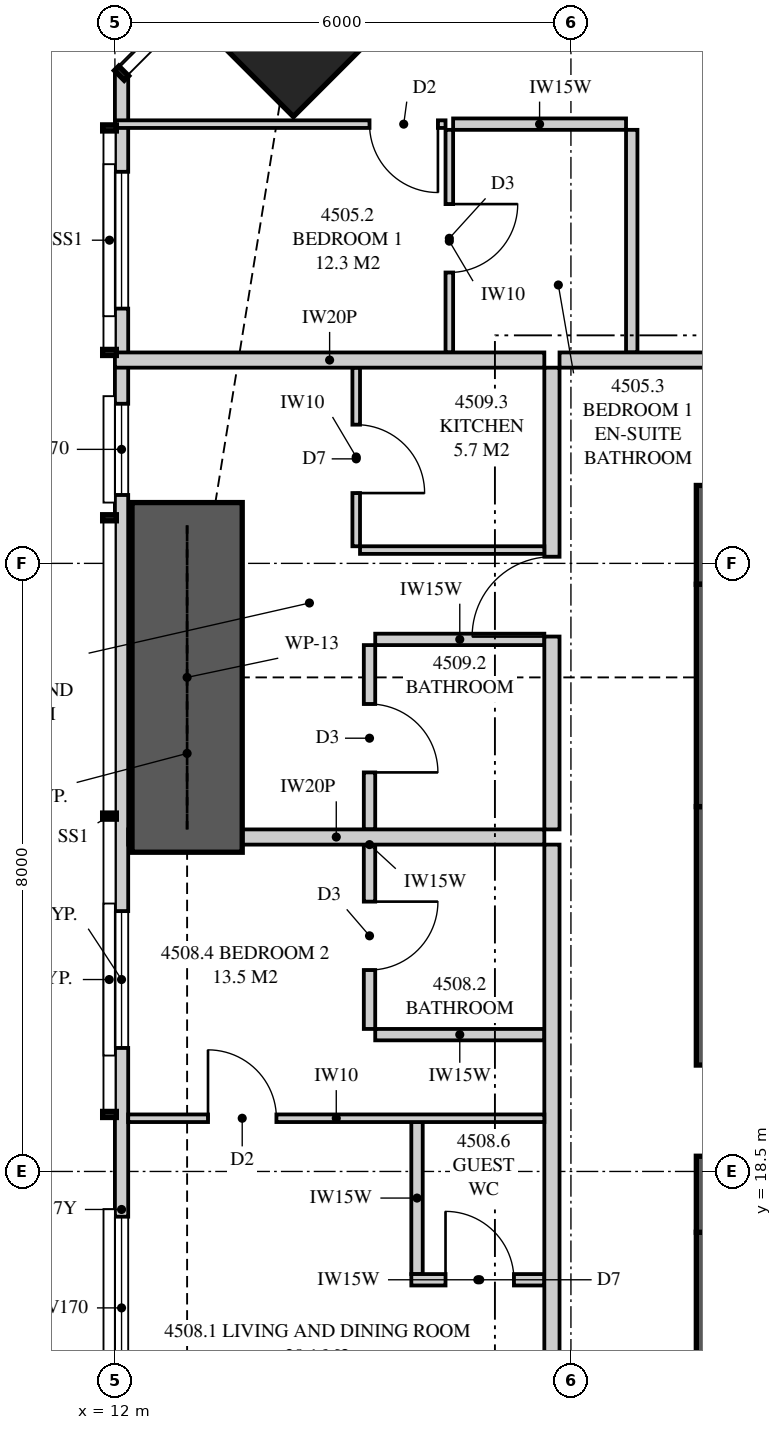
"""IFC4 building model, lengths in metres.
Left out: names, types, materials, properties, quantities, classifications, styles, units other than length and angle.
Written with IfcOpenShell. Run it as: python <this file> out.ifc"""

import sys

from ifc_helpers import new_model, si_unit, direction, frame, frame_2d, origin, origin_2d, place, context, subcontext, project, spatial, polyline, rectangle, outline, extrude, element, fill, save


model = new_model("IFC4")
c1 = context("Model", 3, precision=1e-05, world=origin(), true_north=direction((0.0, 1.0)))
c2 = subcontext(c1, "Body", "Model", "MODEL_VIEW")
j1 = project(units=[si_unit("LENGTHUNIT", "METRE"), si_unit("PLANEANGLEUNIT", "RADIAN")], contexts=[c1])
p1 = place(None, origin())
s1 = spatial("IfcSite", under=j1, at=p1, CompositionType="ELEMENT")
p2 = place(p1, origin())
s2 = spatial("IfcBuilding", under=s1, at=p2, CompositionType="ELEMENT")
p3 = place(p2, frame((0.0, 0.0, 167.75)))
s3 = spatial("IfcBuildingStorey", under=s2, at=p3, CompositionType="ELEMENT", Elevation=167.75)
p4 = place(p3, frame((14.348, 33.652, 0.0), z_axis=(0.0, 0.0, 1.0), x_axis=(0.707106781187, 0.707106781187, 0.0)))
e1 = element("IfcColumn", 1, at=p4, inside=s3, PredefinedType="COLUMN", context=c2, shape_type="SweptSolid", body=[
    extrude(rectangle(XDim=1.8, YDim=1.8, at=origin_2d()), origin(), (0.0, 0.0, 1.0), 3.35),
])
p5 = place(p3, frame((26.0, 26.875, 0.0), z_axis=(0.0, 0.0, 1.0), x_axis=(-1.0, 0.0, 0.0)))
e2 = element("IfcWall", 2, at=p5, inside=s3, PredefinedType="SHEAR", context=c2, shape_type="SweptSolid", body=[
    extrude(rectangle(XDim=6.35, YDim=1.3, at=frame_2d((3.175, 0.0))), origin(), (0.0, 0.0, 1.0), 3.35),
])
p6 = place(p5, frame((0.825, 0.0, 0.0)))
e3 = element("IfcOpeningElement", 3, at=p6, cuts=e2, PredefinedType="OPENING", context=c2, shape_type="SweptSolid", body=[
    extrude(rectangle(XDim=0.75, YDim=2.1, at=frame_2d((0.375, 1.05))), frame((0.0, 0.66, 0.0), z_axis=(0.0, -1.0, 0.0), x_axis=(1.0, 0.0, 0.0)), (0.0, 0.0, 1.0), 1.32),
])
p7 = place(p3, frame((20.0, 26.225, 0.0), z_axis=(0.0, 0.0, 1.0), x_axis=(0.0, -1.0, 0.0)))
e4 = element("IfcWall", 4, at=p7, inside=s3, PredefinedType="SHEAR", context=c2, shape_type="SweptSolid", body=[
    extrude(rectangle(XDim=2.925, YDim=0.7, at=frame_2d((1.462, 0.0))), origin(), (0.0, 0.0, 1.0), 3.35),
])
p8 = place(p3, frame((20.0, 23.3, 0.0), z_axis=(0.0, 0.0, 1.0), x_axis=(0.0, -1.0, 0.0)))
e5 = element("IfcWall", 5, at=p8, inside=s3, PredefinedType="SHEAR", context=c2, shape_type="SweptSolid", body=[
    extrude(rectangle(XDim=5.6, YDim=0.7, at=frame_2d((2.8, 0.0))), origin(), (0.0, 0.0, 1.0), 3.35),
])
p9 = place(p8, frame((3.4, 0.0, 0.0)))
e6 = element("IfcOpeningElement", 6, at=p9, cuts=e5, PredefinedType="OPENING", context=c2, shape_type="SweptSolid", body=[
    extrude(rectangle(XDim=1.2, YDim=2.2, at=frame_2d((0.6, 1.1))), frame((0.0, 0.36, 0.0), z_axis=(0.0, -1.0, 0.0), x_axis=(1.0, 0.0, 0.0)), (0.0, 0.0, 1.0), 0.72),
])
p10 = place(p3, frame((20.0, 17.7, 0.0), z_axis=(0.0, 0.0, 1.0), x_axis=(0.0, -1.0, 0.0)))
e7 = element("IfcWall", 7, at=p10, inside=s3, PredefinedType="SHEAR", context=c2, shape_type="SweptSolid", body=[
    extrude(rectangle(XDim=4.7, YDim=0.7, at=frame_2d((2.35, 0.0))), origin(), (0.0, 0.0, 1.0), 3.35),
])
p11 = place(p3, frame((12.087, 32.949, 0.0), z_axis=(0.0, 0.0, 1.0), x_axis=(0.0, -1.0, 0.0)))
e8 = element("IfcWall", 8, at=p11, inside=s3, PredefinedType="SOLIDWALL", context=c2, shape_type="SweptSolid", body=[
    extrude(outline(polyline([(0.0, 0.0), (29.897, 0.0), (29.897, 3.11), (20.191, 3.11), (20.191, 2.15), (20.051, 2.15), (20.051, 3.11), (19.949, 3.11), (19.949, 2.15), (7.949, 2.15), (7.949, 3.11), (7.823, 3.11), (7.823, 2.15), (7.73, 2.15), (7.73, 3.11), (0.0, 3.11), (0.0, 0.0)])), frame((0.0, 0.087, 0.0), z_axis=(0.0, -1.0, 0.0), x_axis=(1.0, 0.0, 0.0)), (0.0, 0.0, 1.0), 0.175),
])
p12 = place(p11, frame((1.297, 0.0, 0.4)))
e9 = element("IfcOpeningElement", 9, at=p12, cuts=e8, PredefinedType="OPENING", context=c2, shape_type="SweptSolid", body=[
    extrude(rectangle(XDim=1.8, YDim=1.7, at=frame_2d((0.9, 0.85))), frame((0.0, 0.097, 0.0), z_axis=(0.0, -1.0, 0.0), x_axis=(1.0, 0.0, 0.0)), (0.0, 0.0, 1.0), 0.195),
])
p13 = place(p11, frame((4.349, 0.0, 0.4)))
e10 = element("IfcOpeningElement", 10, at=p13, cuts=e8, PredefinedType="OPENING", context=c2, shape_type="SweptSolid", body=[
    extrude(rectangle(XDim=1.2, YDim=1.7, at=frame_2d((0.6, 0.85))), frame((0.0, 0.097, 0.0), z_axis=(0.0, -1.0, 0.0), x_axis=(1.0, 0.0, 0.0)), (0.0, 0.0, 1.0), 0.195),
])
p14 = place(p11, frame((11.024, 0.0, 0.4)))
e11 = element("IfcOpeningElement", 11, at=p14, cuts=e8, PredefinedType="OPENING", context=c2, shape_type="SweptSolid", body=[
    extrude(rectangle(XDim=1.8, YDim=1.7, at=frame_2d((0.9, 0.85))), frame((0.0, 0.097, 0.0), z_axis=(0.0, -1.0, 0.0), x_axis=(1.0, 0.0, 0.0)), (0.0, 0.0, 1.0), 0.195),
])
p15 = place(p11, frame((15.044, 0.0, 0.4)))
e12 = element("IfcOpeningElement", 12, at=p15, cuts=e8, PredefinedType="OPENING", context=c2, shape_type="SweptSolid", body=[
    extrude(rectangle(XDim=2.4, YDim=1.7, at=frame_2d((1.2, 0.85))), frame((0.0, 0.097, 0.0), z_axis=(0.0, -1.0, 0.0), x_axis=(1.0, 0.0, 0.0)), (0.0, 0.0, 1.0), 0.195),
])
p16 = place(p11, frame((22.624, 0.0, 0.0)))
e13 = element("IfcOpeningElement", 13, at=p16, cuts=e8, PredefinedType="OPENING", context=c2, shape_type="SweptSolid", body=[
    extrude(rectangle(XDim=1.8, YDim=2.1, at=frame_2d((0.9, 1.05))), frame((0.0, 0.097, 0.0), z_axis=(0.0, -1.0, 0.0), x_axis=(1.0, 0.0, 0.0)), (0.0, 0.0, 1.0), 0.195),
])
p17 = place(p11, frame((26.301, 0.0, 0.4)))
e14 = element("IfcOpeningElement", 14, at=p17, cuts=e8, PredefinedType="OPENING", context=c2, shape_type="SweptSolid", body=[
    extrude(rectangle(XDim=1.8, YDim=1.7, at=frame_2d((0.9, 0.85))), frame((0.0, 0.097, 0.0), z_axis=(0.0, -1.0, 0.0), x_axis=(1.0, 0.0, 0.0)), (0.0, 0.0, 1.0), 0.195),
])
p18 = place(p3, frame((17.85, 29.175, 0.0), z_axis=(0.0, 0.0, 1.0), x_axis=(1.0, 0.0, 0.0)))
e15 = element("IfcWall", 15, at=p18, inside=s3, PredefinedType="PARTITIONING", context=c2, shape_type="SweptSolid", body=[
    extrude(outline(polyline([(0.0, 0.0), (5.75, 0.0), (5.75, 3.11), (4.737, 3.11), (4.737, 2.541), (4.062, 2.541), (4.062, 3.11), (0.0, 3.11), (0.0, 0.0)])), frame((0.0, 0.1, 0.0), z_axis=(0.0, -1.0, 0.0), x_axis=(1.0, 0.0, 0.0)), (0.0, 0.0, 1.0), 0.2),
])
p19 = place(p18, frame((2.35, 0.0, 0.0)))
e16 = element("IfcOpeningElement", 16, at=p19, cuts=e15, PredefinedType="OPENING", context=c2, shape_type="SweptSolid", body=[
    extrude(rectangle(XDim=1.05, YDim=2.2, at=frame_2d((0.525, 1.1))), frame((0.0, 0.11, 0.0), z_axis=(0.0, -1.0, 0.0), x_axis=(1.0, 0.0, 0.0)), (0.0, 0.0, 1.0), 0.22),
])
p20 = place(p3, frame((16.4, 32.204, 0.0), z_axis=(0.0, 0.0, 1.0), x_axis=(0.0, -1.0, 0.0)))
e17 = element("IfcWall", 17, at=p20, inside=s3, PredefinedType="PARTITIONING", context=c2, shape_type="SweptSolid", body=[
    extrude(rectangle(XDim=2.929, YDim=0.1, at=frame_2d((1.464, 0.0))), origin(), (0.0, 0.0, 1.0), 3.11),
])
p21 = place(p20, frame((0.977, 0.0, 0.0)))
e18 = element("IfcOpeningElement", 18, at=p21, cuts=e17, PredefinedType="OPENING", context=c2, shape_type="SweptSolid", body=[
    extrude(rectangle(XDim=0.9, YDim=2.1, at=frame_2d((0.45, 1.05))), frame((0.0, 0.06, 0.0), z_axis=(0.0, -1.0, 0.0), x_axis=(1.0, 0.0, 0.0)), (0.0, 0.0, 1.0), 0.12),
])
p22 = place(p3, frame((16.35, 32.279, 0.0), z_axis=(0.0, 0.0, 1.0), x_axis=(-1.0, 0.0, 0.0)))
e19 = element("IfcWall", 19, at=p22, inside=s3, PredefinedType="PARTITIONING", context=c2, shape_type="SweptSolid", body=[
    extrude(outline(polyline([(0.0, 0.0), (4.35, 0.0), (4.35, 3.11), (3.094, 3.11), (3.094, 2.15), (1.352, 2.15), (1.352, 3.11), (0.0, 3.11), (0.0, 0.0)])), frame((0.0, 0.05, 0.0), z_axis=(0.0, -1.0, 0.0), x_axis=(1.0, 0.0, 0.0)), (0.0, 0.0, 1.0), 0.1),
])
p23 = place(p22, frame((0.1, 0.0, 0.0)))
e20 = element("IfcOpeningElement", 20, at=p23, cuts=e19, PredefinedType="OPENING", context=c2, shape_type="SweptSolid", body=[
    extrude(rectangle(XDim=0.9, YDim=2.1, at=frame_2d((0.45, 1.05))), frame((0.0, 0.06, 0.0), z_axis=(0.0, -1.0, 0.0), x_axis=(1.0, 0.0, 0.0)), (0.0, 0.0, 1.0), 0.12),
])
p24 = place(p3, frame((18.725, 32.279, 0.0), z_axis=(0.0, 0.0, 1.0), x_axis=(-1.0, 0.0, 0.0)))
e21 = element("IfcWall", 21, at=p24, inside=s3, PredefinedType="PLUMBINGWALL", context=c2, shape_type="SweptSolid", body=[
    extrude(rectangle(XDim=2.275, YDim=0.15, at=frame_2d((1.138, 0.0))), origin(), (0.0, 0.0, 1.0), 3.11),
])
p25 = place(p3, frame((18.8, 32.204, 0.0), z_axis=(0.0, 0.0, 1.0), x_axis=(0.0, -1.0, 0.0)))
e22 = element("IfcWall", 22, at=p25, inside=s3, PredefinedType="PLUMBINGWALL", context=c2, shape_type="SweptSolid", body=[
    extrude(rectangle(XDim=2.929, YDim=0.15, at=frame_2d((1.464, 0.0))), origin(), (0.0, 0.0, 1.0), 3.11),
])
p26 = place(p3, frame((12.0, 29.175, 0.0), z_axis=(0.0, 0.0, 1.0), x_axis=(1.0, 0.0, 0.0)))
e23 = element("IfcWall", 23, at=p26, inside=s3, PredefinedType="PARTITIONING", context=c2, shape_type="SweptSolid", body=[
    extrude(outline(polyline([(0.0, 0.0), (5.65, 0.0), (5.65, 3.11), (2.547, 3.11), (2.547, 2.15), (0.703, 2.15), (0.703, 3.11), (0.0, 3.11), (0.0, 0.0)])), frame((0.0, 0.1, 0.0), z_axis=(0.0, -1.0, 0.0), x_axis=(1.0, 0.0, 0.0)), (0.0, 0.0, 1.0), 0.2),
])
p27 = place(p3, frame((12.175, 22.9, 0.0), z_axis=(0.0, 0.0, 1.0), x_axis=(1.0, 0.0, 0.0)))
e24 = element("IfcWall", 24, at=p27, inside=s3, PredefinedType="PARTITIONING", context=c2, shape_type="SweptSolid", body=[
    extrude(outline(polyline([(0.0, 0.0), (5.475, 0.0), (5.475, 3.11), (1.685, 3.11), (1.685, 2.15), (0.0, 2.15), (0.0, 3.11), (0.0, 0.0)])), frame((0.0, 0.1, 0.0), z_axis=(0.0, -1.0, 0.0), x_axis=(1.0, 0.0, 0.0)), (0.0, 0.0, 1.0), 0.2),
])
p28 = place(p3, frame((17.75, 7.925, 0.0), z_axis=(0.0, 0.0, 1.0), x_axis=(0.0, 1.0, 0.0)))
e25 = element("IfcWall", 25, at=p28, inside=s3, PredefinedType="PARTITIONING", context=c2, shape_type="SweptSolid", body=[
    extrude(outline(polyline([(0.0, 0.0), (14.875, 0.0), (14.875, 3.11), (5.412, 3.11), (5.412, 2.541), (4.738, 2.541), (4.738, 3.11), (0.0, 3.11), (0.0, 0.0)])), frame((0.0, 0.1, 0.0), z_axis=(0.0, -1.0, 0.0), x_axis=(1.0, 0.0, 0.0)), (0.0, 0.0, 1.0), 0.2),
])
p29 = place(p28, frame((6.938, 0.0, 0.0)))
e26 = element("IfcOpeningElement", 26, at=p29, cuts=e25, PredefinedType="OPENING", context=c2, shape_type="SweptSolid", body=[
    extrude(rectangle(XDim=1.05, YDim=2.2, at=frame_2d((0.525, 1.1))), frame((0.0, 0.11, 0.0), z_axis=(0.0, -1.0, 0.0), x_axis=(1.0, 0.0, 0.0)), (0.0, 0.0, 1.0), 0.22),
])
p30 = place(p3, frame((15.35, 20.375, 0.0), z_axis=(0.0, 0.0, 1.0), x_axis=(0.0, 1.0, 0.0)))
e27 = element("IfcWall", 27, at=p30, inside=s3, PredefinedType="PLUMBINGWALL", context=c2, shape_type="SweptSolid", body=[
    extrude(rectangle(XDim=2.425, YDim=0.15, at=frame_2d((1.212, 0.0))), origin(), (0.0, 0.0, 1.0), 3.11),
])
p31 = place(p30, frame((0.775, 0.0, 0.0)))
e28 = element("IfcOpeningElement", 28, at=p31, cuts=e27, PredefinedType="OPENING", context=c2, shape_type="SweptSolid", body=[
    extrude(rectangle(XDim=0.9, YDim=2.1, at=frame_2d((0.45, 1.05))), frame((0.0, 0.085, 0.0), z_axis=(0.0, -1.0, 0.0), x_axis=(1.0, 0.0, 0.0)), (0.0, 0.0, 1.0), 0.17),
])
p32 = place(p3, frame((15.425, 20.3, 0.0), z_axis=(0.0, 0.0, 1.0), x_axis=(1.0, 0.0, 0.0)))
e29 = element("IfcWall", 29, at=p32, inside=s3, PredefinedType="PLUMBINGWALL", context=c2, shape_type="SweptSolid", body=[
    extrude(rectangle(XDim=2.225, YDim=0.15, at=frame_2d((1.112, 0.0))), origin(), (0.0, 0.0, 1.0), 3.11),
])
p33 = place(p3, frame((12.175, 19.2, 0.0), z_axis=(0.0, 0.0, 1.0), x_axis=(1.0, 0.0, 0.0)))
e30 = element("IfcWall", 30, at=p33, inside=s3, PredefinedType="PARTITIONING", context=c2, shape_type="SweptSolid", body=[
    extrude(outline(polyline([(0.0, 0.0), (5.475, 0.0), (5.475, 3.11), (1.635, 3.11), (1.635, 2.15), (0.0, 2.15), (0.0, 3.11), (0.0, 0.0)])), frame((0.0, 0.05, 0.0), z_axis=(0.0, -1.0, 0.0), x_axis=(1.0, 0.0, 0.0)), (0.0, 0.0, 1.0), 0.1),
])
p34 = place(p33, frame((1.05, 0.0, 0.0)))
e31 = element("IfcOpeningElement", 31, at=p34, cuts=e30, PredefinedType="OPENING", context=c2, shape_type="SweptSolid", body=[
    extrude(rectangle(XDim=0.9, YDim=2.1, at=frame_2d((0.45, 1.05))), frame((0.0, 0.06, 0.0), z_axis=(0.0, -1.0, 0.0), x_axis=(1.0, 0.0, 0.0)), (0.0, 0.0, 1.0), 0.12),
])
p35 = place(p3, frame((17.75, 23.0, 0.0), z_axis=(0.0, 0.0, 1.0), x_axis=(0.0, 1.0, 0.0)))
e32 = element("IfcWall", 32, at=p35, inside=s3, PredefinedType="PARTITIONING", context=c2, shape_type="SweptSolid", body=[
    extrude(outline(polyline([(0.0, 0.0), (6.075, 0.0), (6.075, 3.11), (2.337, 3.11), (2.337, 2.541), (1.663, 2.541), (1.663, 3.11), (0.0, 3.11), (0.0, 0.0)])), frame((0.0, 0.1, 0.0), z_axis=(0.0, -1.0, 0.0), x_axis=(1.0, 0.0, 0.0)), (0.0, 0.0, 1.0), 0.2),
])
p36 = place(p35, frame((2.538, 0.0, 0.0)))
e33 = element("IfcOpeningElement", 33, at=p36, cuts=e32, PredefinedType="OPENING", context=c2, shape_type="SweptSolid", body=[
    extrude(rectangle(XDim=1.05, YDim=2.2, at=frame_2d((0.525, 1.1))), frame((0.0, 0.11, 0.0), z_axis=(0.0, -1.0, 0.0), x_axis=(1.0, 0.0, 0.0)), (0.0, 0.0, 1.0), 0.22),
])
p37 = place(p3, frame((15.35, 23.0, 0.0), z_axis=(0.0, 0.0, 1.0), x_axis=(0.0, 1.0, 0.0)))
e34 = element("IfcWall", 34, at=p37, inside=s3, PredefinedType="PLUMBINGWALL", context=c2, shape_type="SweptSolid", body=[
    extrude(outline(polyline([(0.0, 0.0), (2.425, 0.0), (2.425, 3.11), (2.312, 3.11), (2.312, 2.541), (1.688, 2.541), (1.688, 3.11), (0.0, 3.11), (0.0, 0.0)])), frame((0.0, 0.075, 0.0), z_axis=(0.0, -1.0, 0.0), x_axis=(1.0, 0.0, 0.0)), (0.0, 0.0, 1.0), 0.15),
])
p38 = place(p37, frame((0.75, 0.0, 0.0)))
e35 = element("IfcOpeningElement", 35, at=p38, cuts=e34, PredefinedType="OPENING", context=c2, shape_type="SweptSolid", body=[
    extrude(rectangle(XDim=0.9, YDim=2.1, at=frame_2d((0.45, 1.05))), frame((0.0, 0.085, 0.0), z_axis=(0.0, -1.0, 0.0), x_axis=(1.0, 0.0, 0.0)), (0.0, 0.0, 1.0), 0.17),
])
p39 = place(p3, frame((15.425, 25.5, 0.0), z_axis=(0.0, 0.0, 1.0), x_axis=(1.0, 0.0, 0.0)))
e36 = element("IfcWall", 36, at=p39, inside=s3, PredefinedType="PLUMBINGWALL", context=c2, shape_type="SweptSolid", body=[
    extrude(rectangle(XDim=2.225, YDim=0.15, at=frame_2d((1.112, 0.0))), origin(), (0.0, 0.0, 1.0), 3.11),
])
p40 = place(p3, frame((15.175, 26.725, 0.0), z_axis=(0.0, 0.0, 1.0), x_axis=(0.0, 1.0, 0.0)))
e37 = element("IfcWall", 37, at=p40, inside=s3, PredefinedType="PARTITIONING", context=c2, shape_type="SweptSolid", body=[
    extrude(rectangle(XDim=2.35, YDim=0.1, at=frame_2d((1.175, 0.0))), origin(), (0.0, 0.0, 1.0), 3.11),
])
p41 = place(p40, frame((0.7, 0.0, 0.0)))
e38 = element("IfcOpeningElement", 38, at=p41, cuts=e37, PredefinedType="OPENING", context=c2, shape_type="SweptSolid", body=[
    extrude(rectangle(XDim=0.9, YDim=2.1, at=frame_2d((0.45, 1.05))), frame((0.0, 0.06, 0.0), z_axis=(0.0, -1.0, 0.0), x_axis=(1.0, 0.0, 0.0)), (0.0, 0.0, 1.0), 0.12),
])
p42 = place(p3, frame((15.225, 26.675, 0.0), z_axis=(0.0, 0.0, 1.0), x_axis=(1.0, 0.0, 0.0)))
e39 = element("IfcWall", 39, at=p42, inside=s3, PredefinedType="PARTITIONING", context=c2, shape_type="SweptSolid", body=[
    extrude(rectangle(XDim=2.425, YDim=0.1, at=frame_2d((1.212, 0.0))), origin(), (0.0, 0.0, 1.0), 3.11),
])
p43 = place(p3, frame((17.65, 17.075, 0.0), z_axis=(0.0, 0.0, 1.0), x_axis=(-1.0, 0.0, 0.0)))
e40 = element("IfcWall", 40, at=p43, inside=s3, PredefinedType="PLUMBINGWALL", context=c2, shape_type="SweptSolid", body=[
    extrude(rectangle(XDim=1.75, YDim=0.15, at=frame_2d((0.875, 0.0))), origin(), (0.0, 0.0, 1.0), 3.11),
])
p44 = place(p43, frame((0.4, 0.0, 0.0)))
e41 = element("IfcOpeningElement", 41, at=p44, cuts=e40, PredefinedType="OPENING", context=c2, shape_type="SweptSolid", body=[
    extrude(rectangle(XDim=0.9, YDim=2.1, at=frame_2d((0.45, 1.05))), frame((0.0, 0.085, 0.0), z_axis=(0.0, -1.0, 0.0), x_axis=(1.0, 0.0, 0.0)), (0.0, 0.0, 1.0), 0.17),
])
p45 = place(p3, frame((15.975, 19.15, 0.0), z_axis=(0.0, 0.0, 1.0), x_axis=(0.0, -1.0, 0.0)))
e42 = element("IfcWall", 42, at=p45, inside=s3, PredefinedType="PLUMBINGWALL", context=c2, shape_type="SweptSolid", body=[
    extrude(rectangle(XDim=2.0, YDim=0.15, at=frame_2d((1.0, 0.0))), origin(), (0.0, 0.0, 1.0), 3.11),
])
p46 = place(p3, frame((12.95, 22.7, 0.0), z_axis=(0.0, 0.0, 1.0), x_axis=(0.0, 1.0, 0.0)))
e43 = element("IfcWall", 43, at=p46, inside=s3, PredefinedType="SHEAR", context=c2, shape_type="SweptSolid", body=[
    extrude(rectangle(XDim=4.6, YDim=1.45, at=frame_2d((2.3, 0.0))), origin(), (0.0, 0.0, 1.0), 3.35),
])
p47 = place(p12, origin())
e44 = element("IfcWindow", 44, at=p47, inside=s3, PartitioningType="SINGLE_PANEL", PredefinedType="WINDOW", context=c2, shape_type="SweptSolid", body=[
    extrude(rectangle(XDim=1.8, YDim=1.7, at=frame_2d((0.9, 0.85))), frame((0.0, 0.03, 0.0), z_axis=(0.0, -1.0, 0.0), x_axis=(1.0, 0.0, 0.0)), (0.0, 0.0, 1.0), 0.06),
])
fill(e9, e44)
p48 = place(p13, origin())
e45 = element("IfcWindow", 45, at=p48, inside=s3, PartitioningType="SINGLE_PANEL", PredefinedType="WINDOW", context=c2, shape_type="SweptSolid", body=[
    extrude(rectangle(XDim=1.2, YDim=1.7, at=frame_2d((0.6, 0.85))), frame((0.0, 0.03, 0.0), z_axis=(0.0, -1.0, 0.0), x_axis=(1.0, 0.0, 0.0)), (0.0, 0.0, 1.0), 0.06),
])
fill(e10, e45)
p49 = place(p14, origin())
e46 = element("IfcWindow", 46, at=p49, inside=s3, PartitioningType="SINGLE_PANEL", PredefinedType="WINDOW", context=c2, shape_type="SweptSolid", body=[
    extrude(rectangle(XDim=1.8, YDim=1.7, at=frame_2d((0.9, 0.85))), frame((0.0, 0.03, 0.0), z_axis=(0.0, -1.0, 0.0), x_axis=(1.0, 0.0, 0.0)), (0.0, 0.0, 1.0), 0.06),
])
fill(e11, e46)
p50 = place(p15, origin())
e47 = element("IfcWindow", 47, at=p50, inside=s3, PartitioningType="SINGLE_PANEL", PredefinedType="WINDOW", context=c2, shape_type="SweptSolid", body=[
    extrude(rectangle(XDim=2.4, YDim=1.7, at=frame_2d((1.2, 0.85))), frame((0.0, 0.03, 0.0), z_axis=(0.0, -1.0, 0.0), x_axis=(1.0, 0.0, 0.0)), (0.0, 0.0, 1.0), 0.06),
])
fill(e12, e47)
p51 = place(p23, origin())
e48 = element("IfcDoor", 48, at=p51, inside=s3, OperationType="SINGLE_SWING_LEFT", PredefinedType="DOOR", context=c2, shape_type="SweptSolid", body=[
    extrude(rectangle(XDim=0.9, YDim=2.1, at=frame_2d((0.45, 1.05))), frame((0.0, 0.025, 0.0), z_axis=(0.0, -1.0, 0.0), x_axis=(1.0, 0.0, 0.0)), (0.0, 0.0, 1.0), 0.05),
])
fill(e20, e48)
p52 = place(p21, origin())
e49 = element("IfcDoor", 49, at=p52, inside=s3, OperationType="SINGLE_SWING_LEFT", PredefinedType="DOOR", context=c2, shape_type="SweptSolid", body=[
    extrude(rectangle(XDim=0.9, YDim=2.1, at=frame_2d((0.45, 1.05))), frame((0.0, 0.025, 0.0), z_axis=(0.0, -1.0, 0.0), x_axis=(1.0, 0.0, 0.0)), (0.0, 0.0, 1.0), 0.05),
])
fill(e18, e49)
p53 = place(p31, frame((0.9, 0.0, 0.0), z_axis=(0.0, 0.0, 1.0), x_axis=(-1.0, 0.0, 0.0)))
e50 = element("IfcDoor", 50, at=p53, inside=s3, OperationType="SINGLE_SWING_LEFT", PredefinedType="DOOR", context=c2, shape_type="SweptSolid", body=[
    extrude(rectangle(XDim=0.9, YDim=2.1, at=frame_2d((0.45, 1.05))), frame((0.0, 0.025, 0.0), z_axis=(0.0, -1.0, 0.0), x_axis=(1.0, 0.0, 0.0)), (0.0, 0.0, 1.0), 0.05),
])
fill(e28, e50)
p54 = place(p34, origin())
e51 = element("IfcDoor", 51, at=p54, inside=s3, OperationType="SINGLE_SWING_LEFT", PredefinedType="DOOR", context=c2, shape_type="SweptSolid", body=[
    extrude(rectangle(XDim=0.9, YDim=2.1, at=frame_2d((0.45, 1.05))), frame((0.0, 0.025, 0.0), z_axis=(0.0, -1.0, 0.0), x_axis=(1.0, 0.0, 0.0)), (0.0, 0.0, 1.0), 0.05),
])
fill(e31, e51)
p55 = place(p36, origin())
e52 = element("IfcDoor", 52, at=p55, inside=s3, OperationType="SINGLE_SWING_LEFT", PredefinedType="DOOR", context=c2, shape_type="SweptSolid", body=[
    extrude(rectangle(XDim=1.05, YDim=2.2, at=frame_2d((0.525, 1.1))), frame((0.0, 0.025, 0.0), z_axis=(0.0, -1.0, 0.0), x_axis=(1.0, 0.0, 0.0)), (0.0, 0.0, 1.0), 0.05),
])
fill(e33, e52)
p56 = place(p38, frame((0.9, 0.0, 0.0), z_axis=(0.0, 0.0, 1.0), x_axis=(-1.0, 0.0, 0.0)))
e53 = element("IfcDoor", 53, at=p56, inside=s3, OperationType="SINGLE_SWING_RIGHT", PredefinedType="DOOR", context=c2, shape_type="SweptSolid", body=[
    extrude(rectangle(XDim=0.9, YDim=2.1, at=frame_2d((0.45, 1.05))), frame((0.0, 0.025, 0.0), z_axis=(0.0, -1.0, 0.0), x_axis=(1.0, 0.0, 0.0)), (0.0, 0.0, 1.0), 0.05),
])
fill(e35, e53)
p57 = place(p41, frame((0.9, 0.0, 0.0), z_axis=(0.0, 0.0, 1.0), x_axis=(-1.0, 0.0, 0.0)))
e54 = element("IfcDoor", 54, at=p57, inside=s3, OperationType="SINGLE_SWING_RIGHT", PredefinedType="DOOR", context=c2, shape_type="SweptSolid", body=[
    extrude(rectangle(XDim=0.9, YDim=2.1, at=frame_2d((0.45, 1.05))), frame((0.0, 0.025, 0.0), z_axis=(0.0, -1.0, 0.0), x_axis=(1.0, 0.0, 0.0)), (0.0, 0.0, 1.0), 0.05),
])
fill(e38, e54)
p58 = place(p44, frame((0.9, 0.0, 0.0), z_axis=(0.0, 0.0, 1.0), x_axis=(-1.0, 0.0, 0.0)))
e55 = element("IfcDoor", 55, at=p58, inside=s3, OperationType="SINGLE_SWING_LEFT", PredefinedType="DOOR", context=c2, shape_type="SweptSolid", body=[
    extrude(rectangle(XDim=0.9, YDim=2.1, at=frame_2d((0.45, 1.05))), frame((0.0, 0.025, 0.0), z_axis=(0.0, -1.0, 0.0), x_axis=(1.0, 0.0, 0.0)), (0.0, 0.0, 1.0), 0.05),
])
fill(e41, e55)
save(model, sys.argv[1])
